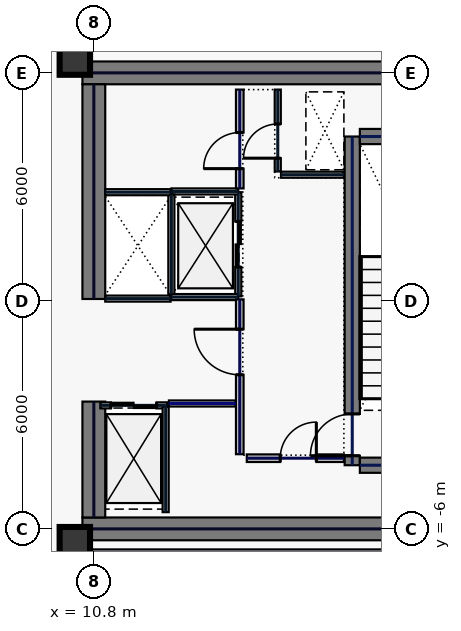
"""IFC4 building model, lengths in metres.
Left out: names, types, materials, properties, quantities, classifications, styles, units other than length and angle.
Written with IfcOpenShell. Run it as: python <this file> out.ifc"""

import sys

from ifc_helpers import new_model, si_unit, direction, frame, frame_2d, origin, origin_2d, place, context, subcontext, project, spatial, rectangle, hollow_rectangle, extrude, element, fill, save


model = new_model("IFC4")
c1 = context("Model", 3, precision=1e-05, world=origin(), true_north=direction((0.0, 1.0)))
c2 = subcontext(c1, "Body", "Model", "MODEL_VIEW")
j1 = project(units=[si_unit("LENGTHUNIT", "METRE"), si_unit("PLANEANGLEUNIT", "RADIAN")], contexts=[c1])
p1 = place(None, origin())
s1 = spatial("IfcSite", under=j1, at=p1, CompositionType="ELEMENT")
p2 = place(p1, origin())
s2 = spatial("IfcBuilding", under=s1, at=p2, CompositionType="ELEMENT")
p3 = place(p2, frame((0.0, 0.0, 230.2)))
s3 = spatial("IfcBuildingStorey", under=s2, at=p3, CompositionType="ELEMENT", Elevation=230.2)
for number, where, z_axis, x_axis in (
    (1, (10.5, 6.0, 0.0), (0.0, 0.0, 1.0), (1.0, 0.0, 0.0)),
    (2, (10.5, -6.0, 0.0), (0.0, 0.0, 1.0), (1.0, 0.0, 0.0)),
):
    element("IfcWall", number, at=place(p3, frame(where, z_axis=z_axis, x_axis=x_axis)), inside=s3, PredefinedType="SHEAR", context=c2, shape_type="SweptSolid", body=[
        extrude(rectangle(XDim=11.5, YDim=0.6, at=frame_2d((5.75, 0.0))), origin(), (0.0, 0.0, 1.0), 3.74),
    ])
p4 = place(p3, frame((10.8, -5.7, 0.0), z_axis=(0.0, 0.0, 1.0), x_axis=(0.0, 1.0, 0.0)))
e3 = element("IfcWall", 3, at=p4, inside=s3, PredefinedType="SHEAR", context=c2, shape_type="SweptSolid", body=[
    extrude(rectangle(XDim=3.05, YDim=0.6, at=frame_2d((1.525, 0.0))), origin(), (0.0, 0.0, 1.0), 3.74),
])
p5 = place(p3, frame((10.8, 0.05, 0.0), z_axis=(0.0, 0.0, 1.0), x_axis=(0.0, 1.0, 0.0)))
e4 = element("IfcWall", 4, at=p5, inside=s3, PredefinedType="SHEAR", context=c2, shape_type="SweptSolid", body=[
    extrude(rectangle(XDim=5.65, YDim=0.6, at=frame_2d((2.825, 0.0))), origin(), (0.0, 0.0, 1.0), 3.74),
])
p6 = place(p3, frame((17.6, -4.325, 0.0), z_axis=(0.0, 0.0, 1.0), x_axis=(0.0, 1.0, 0.0)))
e5 = element("IfcWall", 5, at=p6, inside=s3, PredefinedType="SHEAR", context=c2, shape_type="SweptSolid", body=[
    extrude(rectangle(XDim=8.65, YDim=0.4, at=frame_2d((4.325, 0.0))), origin(), (0.0, 0.0, 1.0), 3.74),
])
p7 = place(p6, frame((0.25, 0.0, 0.0)))
e6 = element("IfcOpeningElement", 6, at=p7, cuts=e5, PredefinedType="OPENING", context=c2, shape_type="SweptSolid", body=[
    extrude(rectangle(XDim=1.1, YDim=2.2, at=frame_2d((0.55, 1.1))), frame((0.0, 0.21, 0.0), z_axis=(0.0, -1.0, 0.0), x_axis=(1.0, 0.0, 0.0)), (0.0, 0.0, 1.0), 0.42),
])
for number, where, z_axis, x_axis in (
    (7, (17.8, -4.325, 0.0), (0.0, 0.0, 1.0), (1.0, 0.0, 0.0)),
    (8, (17.8, 4.325, 0.0), (0.0, 0.0, 1.0), (1.0, 0.0, 0.0)),
):
    element("IfcWall", number, at=place(p3, frame(where, z_axis=z_axis, x_axis=x_axis)), inside=s3, PredefinedType="SHEAR", context=c2, shape_type="SweptSolid", body=[
        extrude(rectangle(XDim=3.4, YDim=0.4, at=frame_2d((1.7, 0.0))), origin(), (0.0, 0.0, 1.0), 3.74),
    ])
for number, where, z_axis, x_axis in (
    (9, (10.3, -6.35, 0.0), (0.0, 0.0, 1.0), (1.0, 0.0, 0.0)),
    (10, (10.3, 6.35, 0.0), (0.0, 0.0, 1.0), (1.0, 0.0, 0.0)),
):
    element("IfcColumn", number, at=place(p3, frame(where, z_axis=z_axis, x_axis=x_axis)), inside=s3, PredefinedType="COLUMN", context=c2, shape_type="SweptSolid", body=[
        extrude(hollow_rectangle(XDim=0.8, YDim=0.8, WallThickness=0.036, at=origin_2d()), origin(), (0.0, 0.0, 1.0), 3.74),
    ])
p8 = place(p3, frame((14.6, 0.12, 0.0), z_axis=(0.0, 0.0, 1.0), x_axis=(0.0, 1.0, 0.0)))
e11 = element("IfcWall", 11, at=p8, inside=s3, PredefinedType="PARTITIONING", context=c2, shape_type="SweptSolid", body=[
    extrude(rectangle(XDim=2.74, YDim=0.16, at=frame_2d((1.37, 0.0))), origin(), (0.0, 0.0, 1.0), 3.74),
])
p9 = place(p8, frame((0.77, 0.0, 0.0)))
e12 = element("IfcOpeningElement", 12, at=p9, cuts=e11, PredefinedType="OPENING", context=c2, shape_type="SweptSolid", body=[
    extrude(rectangle(XDim=1.2, YDim=2.2, at=frame_2d((0.6, 1.1))), frame((0.0, 0.09, 0.0), z_axis=(0.0, -1.0, 0.0), x_axis=(1.0, 0.0, 0.0)), (0.0, 0.0, 1.0), 0.18),
])
for number, where, z_axis, x_axis in (
    (13, (12.84, 0.1, 0.0), (0.0, 0.0, 1.0), (1.0, 0.0, 0.0)),
    (14, (12.84, 2.88, 0.0), (0.0, 0.0, 1.0), (1.0, 0.0, 0.0)),
):
    element("IfcWall", number, at=place(p3, frame(where, z_axis=z_axis, x_axis=x_axis)), inside=s3, PredefinedType="PARTITIONING", context=c2, shape_type="SweptSolid", body=[
        extrude(rectangle(XDim=1.76, YDim=0.16, at=frame_2d((0.88, 0.0))), origin(), (0.0, 0.0, 1.0), 3.74),
    ])
p10 = place(p3, frame((12.84, 0.18, 0.0), z_axis=(0.0, 0.0, 1.0), x_axis=(0.0, 1.0, 0.0)))
e15 = element("IfcWall", 15, at=p10, inside=s3, PredefinedType="PARTITIONING", context=c2, shape_type="SweptSolid", body=[
    extrude(rectangle(XDim=2.62, YDim=0.16, at=frame_2d((1.31, 0.0))), origin(), (0.0, 0.0, 1.0), 3.74),
])
p11 = place(p3, frame((10.97, -2.75, 0.0), z_axis=(0.0, 0.0, 1.0), x_axis=(1.0, 0.0, 0.0)))
e16 = element("IfcWall", 16, at=p11, inside=s3, PredefinedType="PARTITIONING", context=c2, shape_type="SweptSolid", body=[
    extrude(rectangle(XDim=1.76, YDim=0.16, at=frame_2d((0.88, 0.0))), origin(), (0.0, 0.0, 1.0), 3.74),
])
p12 = place(p11, frame((0.28, 0.0, 0.0)))
e17 = element("IfcOpeningElement", 17, at=p12, cuts=e16, PredefinedType="OPENING", context=c2, shape_type="SweptSolid", body=[
    extrude(rectangle(XDim=1.2, YDim=2.2, at=frame_2d((0.6, 1.1))), frame((0.0, 0.09, 0.0), z_axis=(0.0, -1.0, 0.0), x_axis=(1.0, 0.0, 0.0)), (0.0, 0.0, 1.0), 0.18),
])
for number, where, z_axis, x_axis in (
    (18, (11.1, 0.06, 0.0), (0.0, 0.0, 1.0), (1.0, 0.0, 0.0)),
    (19, (11.1, 2.86, 0.0), (0.0, 0.0, 1.0), (1.0, 0.0, 0.0)),
):
    element("IfcWall", number, at=place(p3, frame(where, z_axis=z_axis, x_axis=x_axis)), inside=s3, PredefinedType="PARTITIONING", context=c2, shape_type="SweptSolid", body=[
        extrude(rectangle(XDim=1.72, YDim=0.16, at=frame_2d((0.86, 0.0))), origin(), (0.0, 0.0, 1.0), 3.74),
    ])
p13 = place(p3, frame((15.64, 3.405, 0.0), z_axis=(0.0, 0.0, 1.0), x_axis=(0.0, 1.0, 0.0)))
e20 = element("IfcWall", 20, at=p13, inside=s3, PredefinedType="PARTITIONING", context=c2, shape_type="SweptSolid", body=[
    extrude(rectangle(XDim=2.155, YDim=0.16, at=frame_2d((1.078, 0.0))), origin(), (0.0, 0.0, 1.0), 3.74),
])
p14 = place(p13, frame((0.35, 0.0, 0.0)))
e21 = element("IfcOpeningElement", 21, at=p14, cuts=e20, PredefinedType="OPENING", context=c2, shape_type="SweptSolid", body=[
    extrude(rectangle(XDim=0.9, YDim=2.2, at=frame_2d((0.45, 1.1))), frame((0.0, 0.09, 0.0), z_axis=(0.0, -1.0, 0.0), x_axis=(1.0, 0.0, 0.0)), (0.0, 0.0, 1.0), 0.18),
])
p15 = place(p3, frame((15.725, 3.32, 0.0), z_axis=(0.0, 0.0, 1.0), x_axis=(1.0, 0.0, 0.0)))
e22 = element("IfcWall", 22, at=p15, inside=s3, PredefinedType="PARTITIONING", context=c2, shape_type="SweptSolid", body=[
    extrude(rectangle(XDim=1.655, YDim=0.16, at=frame_2d((0.827, 0.0))), origin(), (0.0, 0.0, 1.0), 3.74),
])
p16 = place(p3, frame((14.825, -4.14, 0.0), z_axis=(0.0, 0.0, 1.0), x_axis=(1.0, 0.0, 0.0)))
e23 = element("IfcWall", 23, at=p16, inside=s3, PredefinedType="SOLIDWALL", context=c2, shape_type="SweptSolid", body=[
    extrude(rectangle(XDim=2.555, YDim=0.2, at=frame_2d((1.277, 0.0))), origin(), (0.0, 0.0, 1.0), 3.74),
])
p17 = place(p16, frame((0.88, 0.0, 0.0)))
e24 = element("IfcOpeningElement", 24, at=p17, cuts=e23, PredefinedType="OPENING", context=c2, shape_type="SweptSolid", body=[
    extrude(rectangle(XDim=0.95, YDim=2.2, at=frame_2d((0.475, 1.1))), frame((0.0, 0.11, 0.0), z_axis=(0.0, -1.0, 0.0), x_axis=(1.0, 0.0, 0.0)), (0.0, 0.0, 1.0), 0.22),
])
p18 = place(p3, frame((12.775, -2.7, 0.0), z_axis=(0.0, 0.0, 1.0), x_axis=(1.0, 0.0, 0.0)))
e25 = element("IfcWall", 25, at=p18, inside=s3, PredefinedType="PARTITIONING", context=c2, shape_type="SweptSolid", body=[
    extrude(rectangle(XDim=1.76, YDim=0.16, at=frame_2d((0.88, 0.0))), origin(), (0.0, 0.0, 1.0), 3.74),
])
p19 = place(p3, frame((12.69, -5.56, 0.0), z_axis=(0.0, 0.0, 1.0), x_axis=(0.0, 1.0, 0.0)))
e26 = element("IfcWall", 26, at=p19, inside=s3, PredefinedType="PARTITIONING", context=c2, shape_type="SweptSolid", body=[
    extrude(rectangle(XDim=2.775, YDim=0.16, at=frame_2d((1.388, 0.0))), origin(), (0.0, 0.0, 1.0), 3.74),
])
p20 = place(p3, frame((14.64, 2.96, 0.0), z_axis=(0.0, 0.0, 1.0), x_axis=(0.0, 1.0, 0.0)))
e27 = element("IfcWall", 27, at=p20, inside=s3, PredefinedType="SOLIDWALL", context=c2, shape_type="SweptSolid", body=[
    extrude(rectangle(XDim=2.6, YDim=0.2, at=frame_2d((1.3, 0.0))), origin(), (0.0, 0.0, 1.0), 3.74),
])
p21 = place(p20, frame((0.52, 0.0, 0.0)))
e28 = element("IfcOpeningElement", 28, at=p21, cuts=e27, PredefinedType="OPENING", context=c2, shape_type="SweptSolid", body=[
    extrude(rectangle(XDim=0.95, YDim=2.2, at=frame_2d((0.475, 1.1))), frame((0.0, 0.11, 0.0), z_axis=(0.0, -1.0, 0.0), x_axis=(1.0, 0.0, 0.0)), (0.0, 0.0, 1.0), 0.22),
])
p22 = place(p3, frame((14.64, -4.035, 0.0), z_axis=(0.0, 0.0, 1.0), x_axis=(0.0, 1.0, 0.0)))
e29 = element("IfcWall", 29, at=p22, inside=s3, PredefinedType="SOLIDWALL", context=c2, shape_type="SweptSolid", body=[
    extrude(rectangle(XDim=4.075, YDim=0.2, at=frame_2d((2.038, 0.0))), origin(), (0.0, 0.0, 1.0), 3.74),
])
p23 = place(p22, frame((2.09, 0.0, 0.0)))
e30 = element("IfcOpeningElement", 30, at=p23, cuts=e29, PredefinedType="OPENING", context=c2, shape_type="SweptSolid", body=[
    extrude(rectangle(XDim=1.2, YDim=2.2, at=frame_2d((0.6, 1.1))), frame((0.0, 0.11, 0.0), z_axis=(0.0, -1.0, 0.0), x_axis=(1.0, 0.0, 0.0)), (0.0, 0.0, 1.0), 0.22),
])
p24 = place(p3, frame((10.63, -6.62, 0.0), z_axis=(0.0, 0.0, 1.0), x_axis=(1.0, 0.0, 0.0)))
e31 = element("IfcWall", 31, at=p24, inside=s3, PredefinedType="PARTITIONING", context=c2, shape_type="SweptSolid", body=[
    extrude(rectangle(XDim=14.185, YDim=0.16, at=frame_2d((7.093, 0.0))), origin(), (0.0, 0.0, 1.0), 3.74),
])
p25 = place(p7, origin())
e32 = element("IfcDoor", 32, at=p25, inside=s3, OperationType="SINGLE_SWING_LEFT", PredefinedType="DOOR", context=c2, shape_type="SweptSolid", body=[
    extrude(rectangle(XDim=1.1, YDim=2.2, at=frame_2d((0.55, 1.1))), frame((0.0, 0.025, 0.0), z_axis=(0.0, -1.0, 0.0), x_axis=(1.0, 0.0, 0.0)), (0.0, 0.0, 1.0), 0.05),
])
fill(e6, e32)
p26 = place(p9, origin())
e33 = element("IfcDoor", 33, at=p26, inside=s3, OperationType="SLIDING_TO_LEFT", PredefinedType="DOOR", context=c2, shape_type="SweptSolid", body=[
    extrude(rectangle(XDim=1.2, YDim=2.2, at=frame_2d((0.6, 1.1))), frame((0.0, 0.025, 0.0), z_axis=(0.0, -1.0, 0.0), x_axis=(1.0, 0.0, 0.0)), (0.0, 0.0, 1.0), 0.05),
])
fill(e12, e33)
p27 = place(p12, origin())
e34 = element("IfcDoor", 34, at=p27, inside=s3, OperationType="SLIDING_TO_LEFT", PredefinedType="DOOR", context=c2, shape_type="SweptSolid", body=[
    extrude(rectangle(XDim=1.2, YDim=2.2, at=frame_2d((0.6, 1.1))), frame((0.0, 0.025, 0.0), z_axis=(0.0, -1.0, 0.0), x_axis=(1.0, 0.0, 0.0)), (0.0, 0.0, 1.0), 0.05),
])
fill(e17, e34)
p28 = place(p14, origin())
e35 = element("IfcDoor", 35, at=p28, inside=s3, OperationType="SINGLE_SWING_LEFT", PredefinedType="DOOR", context=c2, shape_type="SweptSolid", body=[
    extrude(rectangle(XDim=0.9, YDim=2.2, at=frame_2d((0.45, 1.1))), frame((0.0, 0.025, 0.0), z_axis=(0.0, -1.0, 0.0), x_axis=(1.0, 0.0, 0.0)), (0.0, 0.0, 1.0), 0.05),
])
fill(e21, e35)
p29 = place(p17, origin())
e36 = element("IfcDoor", 36, at=p29, inside=s3, OperationType="SINGLE_SWING_RIGHT", PredefinedType="DOOR", context=c2, shape_type="SweptSolid", body=[
    extrude(rectangle(XDim=0.95, YDim=2.2, at=frame_2d((0.475, 1.1))), frame((0.0, 0.025, 0.0), z_axis=(0.0, -1.0, 0.0), x_axis=(1.0, 0.0, 0.0)), (0.0, 0.0, 1.0), 0.05),
])
fill(e24, e36)
p30 = place(p21, origin())
e37 = element("IfcDoor", 37, at=p30, inside=s3, OperationType="SINGLE_SWING_LEFT", PredefinedType="DOOR", context=c2, shape_type="SweptSolid", body=[
    extrude(rectangle(XDim=0.95, YDim=2.2, at=frame_2d((0.475, 1.1))), frame((0.0, 0.025, 0.0), z_axis=(0.0, -1.0, 0.0), x_axis=(1.0, 0.0, 0.0)), (0.0, 0.0, 1.0), 0.05),
])
fill(e28, e37)
p31 = place(p23, origin())
e38 = element("IfcDoor", 38, at=p31, inside=s3, OperationType="SINGLE_SWING_RIGHT", PredefinedType="DOOR", context=c2, shape_type="SweptSolid", body=[
    extrude(rectangle(XDim=1.2, YDim=2.2, at=frame_2d((0.6, 1.1))), frame((0.0, 0.025, 0.0), z_axis=(0.0, -1.0, 0.0), x_axis=(1.0, 0.0, 0.0)), (0.0, 0.0, 1.0), 0.05),
])
fill(e30, e38)
save(model, sys.argv[1])
